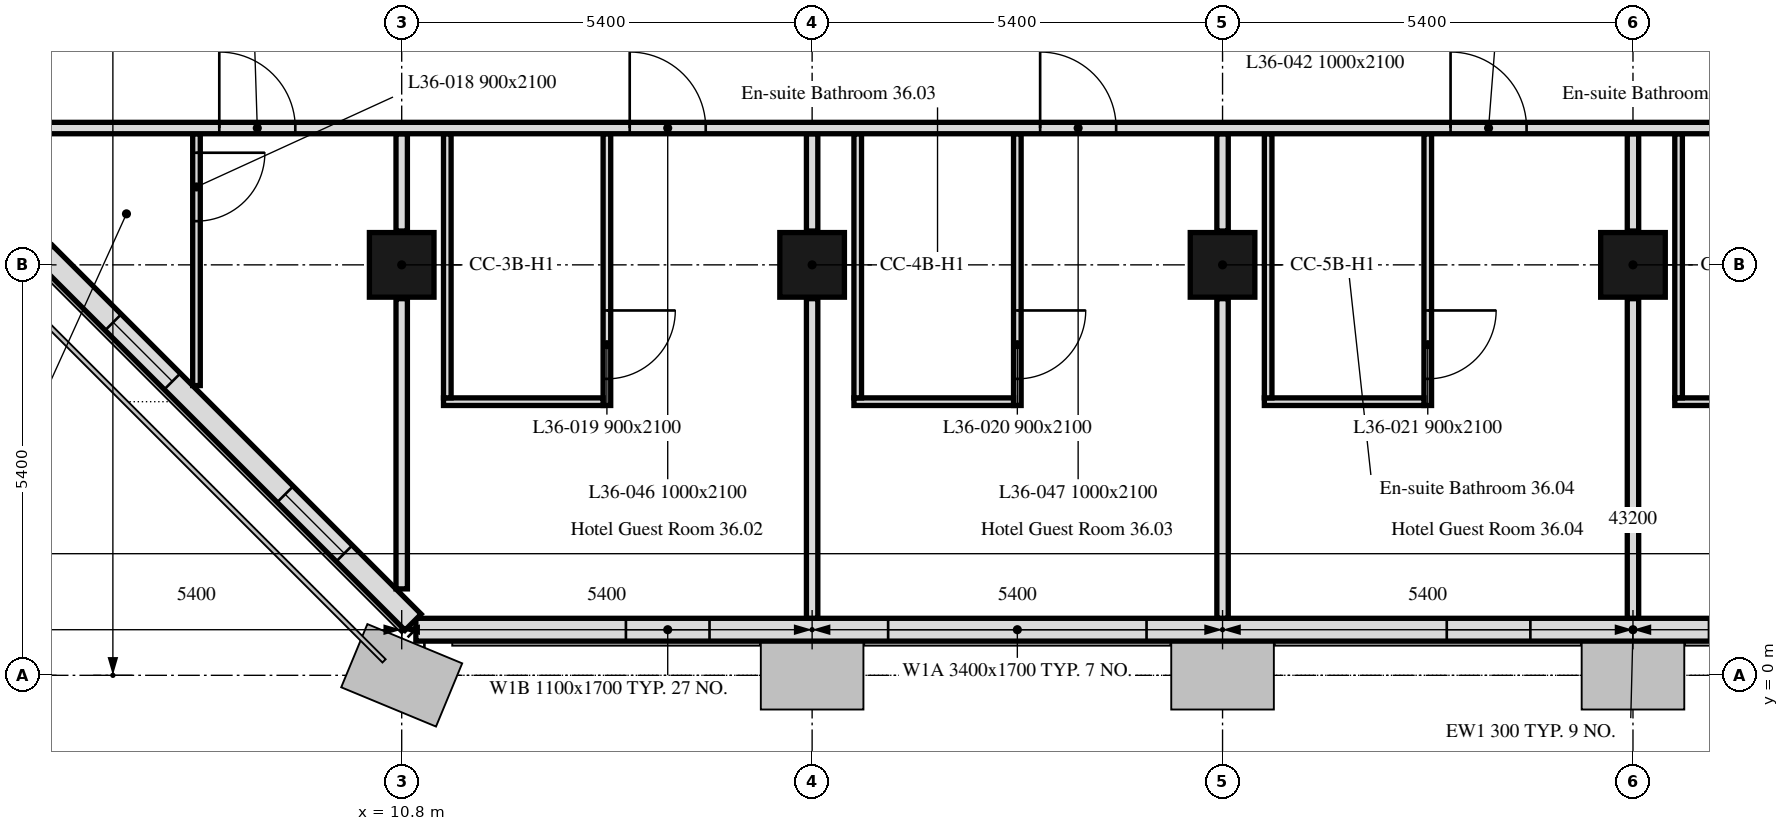
"""IFC4 building model, lengths in metres.
Left out: names, types, materials, properties, quantities, classifications, styles, units other than length and angle.
Written with IfcOpenShell. Run it as: python <this file> out.ifc"""

import sys

from ifc_helpers import new_model, si_unit, direction, frame, frame_2d, origin, origin_2d, place, context, subcontext, project, spatial, rectangle, extrude, element, fill, save


model = new_model("IFC4")
c1 = context("Model", 3, precision=1e-05, world=origin(), true_north=direction((0.0, 1.0)))
c2 = subcontext(c1, "Body", "Model", "MODEL_VIEW")
j1 = project(units=[si_unit("LENGTHUNIT", "METRE"), si_unit("PLANEANGLEUNIT", "RADIAN")], contexts=[c1])
p1 = place(None, origin())
s1 = spatial("IfcSite", under=j1, at=p1, CompositionType="ELEMENT")
p2 = place(p1, origin())
s2 = spatial("IfcBuilding", under=s1, at=p2, CompositionType="ELEMENT")
p3 = place(p2, frame((0.0, 0.0, 156.1)))
s3 = spatial("IfcBuildingStorey", under=s2, at=p3, CompositionType="ELEMENT", Elevation=156.1)
for number, where, z_axis, x_axis in (
    (1, (10.8, 5.4, 0.0), (0.0, 0.0, 1.0), (1.0, 0.0, 0.0)),
    (2, (16.2, 5.4, 0.0), (0.0, 0.0, 1.0), (1.0, 0.0, 0.0)),
    (3, (21.6, 5.4, 0.0), (0.0, 0.0, 1.0), (1.0, 0.0, 0.0)),
    (4, (27.0, 5.4, 0.0), (0.0, 0.0, 1.0), (1.0, 0.0, 0.0)),
):
    element("IfcColumn", number, at=place(p3, frame(where, z_axis=z_axis, x_axis=x_axis)), inside=s3, PredefinedType="COLUMN", context=c2, shape_type="SweptSolid", body=[
        extrude(rectangle(XDim=0.85, YDim=0.85, at=origin_2d()), origin(), (0.0, 0.0, 1.0), 3.0),
    ])
p4 = place(p3, frame((10.986, 0.6, 0.0), z_axis=(0.0, 0.0, 1.0), x_axis=(1.0, 0.0, 0.0)))
e5 = element("IfcWall", 5, at=p4, inside=s3, PredefinedType="SOLIDWALL", context=c2, shape_type="SweptSolid", body=[
    extrude(rectangle(XDim=32.027, YDim=0.3, at=frame_2d((16.014, 0.0))), origin(), (0.0, 0.0, 1.0), 3.0),
])
p5 = place(p4, frame((2.764, 0.0, 0.9)))
e6 = element("IfcOpeningElement", 6, at=p5, cuts=e5, PredefinedType="OPENING", context=c2, shape_type="SweptSolid", body=[
    extrude(rectangle(XDim=1.1, YDim=1.7, at=frame_2d((0.55, 0.85))), frame((0.0, 0.16, 0.0), z_axis=(0.0, -1.0, 0.0), x_axis=(1.0, 0.0, 0.0)), (0.0, 0.0, 1.0), 0.32),
])
p6 = place(p4, frame((6.214, 0.0, 0.9)))
e7 = element("IfcOpeningElement", 7, at=p6, cuts=e5, PredefinedType="OPENING", context=c2, shape_type="SweptSolid", body=[
    extrude(rectangle(XDim=3.4, YDim=1.7, at=frame_2d((1.7, 0.85))), frame((0.0, 0.16, 0.0), z_axis=(0.0, -1.0, 0.0), x_axis=(1.0, 0.0, 0.0)), (0.0, 0.0, 1.0), 0.32),
])
p7 = place(p4, frame((13.564, 0.0, 0.9)))
e8 = element("IfcOpeningElement", 8, at=p7, cuts=e5, PredefinedType="OPENING", context=c2, shape_type="SweptSolid", body=[
    extrude(rectangle(XDim=1.1, YDim=1.7, at=frame_2d((0.55, 0.85))), frame((0.0, 0.16, 0.0), z_axis=(0.0, -1.0, 0.0), x_axis=(1.0, 0.0, 0.0)), (0.0, 0.0, 1.0), 0.32),
])
p8 = place(p4, frame((17.014, 0.0, 0.9)))
e9 = element("IfcOpeningElement", 9, at=p8, cuts=e5, PredefinedType="OPENING", context=c2, shape_type="SweptSolid", body=[
    extrude(rectangle(XDim=3.4, YDim=1.7, at=frame_2d((1.7, 0.85))), frame((0.0, 0.16, 0.0), z_axis=(0.0, -1.0, 0.0), x_axis=(1.0, 0.0, 0.0)), (0.0, 0.0, 1.0), 0.32),
])
p9 = place(p4, frame((24.364, 0.0, 0.9)))
e10 = element("IfcOpeningElement", 10, at=p9, cuts=e5, PredefinedType="OPENING", context=c2, shape_type="SweptSolid", body=[
    extrude(rectangle(XDim=1.1, YDim=1.7, at=frame_2d((0.55, 0.85))), frame((0.0, 0.16, 0.0), z_axis=(0.0, -1.0, 0.0), x_axis=(1.0, 0.0, 0.0)), (0.0, 0.0, 1.0), 0.32),
])
p10 = place(p4, frame((27.814, 0.0, 0.9)))
e11 = element("IfcOpeningElement", 11, at=p10, cuts=e5, PredefinedType="OPENING", context=c2, shape_type="SweptSolid", body=[
    extrude(rectangle(XDim=3.4, YDim=1.7, at=frame_2d((1.7, 0.85))), frame((0.0, 0.16, 0.0), z_axis=(0.0, -1.0, 0.0), x_axis=(1.0, 0.0, 0.0)), (0.0, 0.0, 1.0), 0.32),
])
p11 = place(p3, frame((6.099, 5.55, 0.0), z_axis=(0.0, 0.0, 1.0), x_axis=(0.707106781187, -0.707106781187, 0.0)))
e12 = element("IfcWall", 12, at=p11, inside=s3, PredefinedType="SOLIDWALL", context=c2, shape_type="SweptSolid", body=[
    extrude(rectangle(XDim=6.86, YDim=0.3, at=frame_2d((3.43, 0.0))), origin(), (0.0, 0.0, 1.0), 3.0),
])
p12 = place(p11, frame((1.28, 0.0, 0.9)))
e13 = element("IfcOpeningElement", 13, at=p12, cuts=e12, PredefinedType="OPENING", context=c2, shape_type="SweptSolid", body=[
    extrude(rectangle(XDim=1.1, YDim=1.7, at=frame_2d((0.55, 0.85))), frame((0.0, 0.16, 0.0), z_axis=(0.0, -1.0, 0.0), x_axis=(1.0, 0.0, 0.0)), (0.0, 0.0, 1.0), 0.32),
])
p13 = place(p11, frame((4.48, 0.0, 0.9)))
e14 = element("IfcOpeningElement", 14, at=p13, cuts=e12, PredefinedType="OPENING", context=c2, shape_type="SweptSolid", body=[
    extrude(rectangle(XDim=1.1, YDim=1.7, at=frame_2d((0.55, 0.85))), frame((0.0, 0.16, 0.0), z_axis=(0.0, -1.0, 0.0), x_axis=(1.0, 0.0, 0.0)), (0.0, 0.0, 1.0), 0.32),
])
p14 = place(p3, frame((10.8, 1.137, 0.0), z_axis=(0.0, 0.0, 1.0), x_axis=(0.0, 1.0, 0.0)))
e15 = element("IfcWall", 15, at=p14, inside=s3, PredefinedType="PARTITIONING", context=c2, shape_type="SweptSolid", body=[
    extrude(rectangle(XDim=3.818, YDim=0.15, at=frame_2d((1.909, 0.0))), origin(), (0.0, 0.0, 1.0), 3.0),
])
p15 = place(p3, frame((10.8, 5.845, 0.0), z_axis=(0.0, 0.0, 1.0), x_axis=(0.0, 1.0, 0.0)))
e16 = element("IfcWall", 16, at=p15, inside=s3, PredefinedType="PARTITIONING", context=c2, shape_type="SweptSolid", body=[
    extrude(rectangle(XDim=1.28, YDim=0.15, at=frame_2d((0.64, 0.0))), origin(), (0.0, 0.0, 1.0), 3.0),
])
p16 = place(p3, frame((8.1, 7.125, 0.0), z_axis=(0.0, 0.0, 1.0), x_axis=(0.0, -1.0, 0.0)))
e17 = element("IfcWall", 17, at=p16, inside=s3, PredefinedType="PARTITIONING", context=c2, shape_type="SweptSolid", body=[
    extrude(rectangle(XDim=3.313, YDim=0.1, at=frame_2d((1.656, 0.0))), origin(), (0.0, 0.0, 1.0), 3.0),
])
p17 = place(p16, frame((0.25, 0.0, 0.0)))
e18 = element("IfcOpeningElement", 18, at=p17, cuts=e17, PredefinedType="OPENING", context=c2, shape_type="SweptSolid", body=[
    extrude(rectangle(XDim=0.9, YDim=2.1, at=frame_2d((0.45, 1.05))), frame((0.0, 0.05, 0.0), z_axis=(0.0, -1.0, 0.0), x_axis=(1.0, 0.0, 0.0)), (0.0, 0.0, 1.0), 0.1),
])
p18 = place(p3, frame((16.2, 0.751, 0.0), z_axis=(0.0, 0.0, 1.0), x_axis=(0.0, 1.0, 0.0)))
e19 = element("IfcWall", 19, at=p18, inside=s3, PredefinedType="PARTITIONING", context=c2, shape_type="SweptSolid", body=[
    extrude(rectangle(XDim=4.204, YDim=0.15, at=frame_2d((2.102, 0.0))), origin(), (0.0, 0.0, 1.0), 2.4),
])
p19 = place(p3, frame((16.2, 5.845, 0.0), z_axis=(0.0, 0.0, 1.0), x_axis=(0.0, 1.0, 0.0)))
e20 = element("IfcWall", 20, at=p19, inside=s3, PredefinedType="PARTITIONING", context=c2, shape_type="SweptSolid", body=[
    extrude(rectangle(XDim=1.28, YDim=0.15, at=frame_2d((0.64, 0.0))), origin(), (0.0, 0.0, 1.0), 2.4),
])
p20 = place(p3, frame((13.5, 7.125, 0.0), z_axis=(0.0, 0.0, 1.0), x_axis=(0.0, -1.0, 0.0)))
e21 = element("IfcWall", 21, at=p20, inside=s3, PredefinedType="PARTITIONING", context=c2, shape_type="SweptSolid", body=[
    extrude(rectangle(XDim=3.575, YDim=0.1, at=frame_2d((1.788, 0.0))), origin(), (0.0, 0.0, 1.0), 3.0),
])
p21 = place(p20, frame((2.325, 0.0, 0.0)))
e22 = element("IfcOpeningElement", 22, at=p21, cuts=e21, PredefinedType="OPENING", context=c2, shape_type="SweptSolid", body=[
    extrude(rectangle(XDim=0.9, YDim=2.1, at=frame_2d((0.45, 1.05))), frame((0.0, 0.05, 0.0), z_axis=(0.0, -1.0, 0.0), x_axis=(1.0, 0.0, 0.0)), (0.0, 0.0, 1.0), 0.1),
])
p22 = place(p3, frame((13.45, 3.6, 0.0), z_axis=(0.0, 0.0, 1.0), x_axis=(-1.0, 0.0, 0.0)))
e23 = element("IfcWall", 23, at=p22, inside=s3, PredefinedType="PARTITIONING", context=c2, shape_type="SweptSolid", body=[
    extrude(rectangle(XDim=2.1, YDim=0.1, at=frame_2d((1.05, 0.0))), origin(), (0.0, 0.0, 1.0), 3.0),
])
p23 = place(p3, frame((11.4, 3.65, 0.0), z_axis=(0.0, 0.0, 1.0), x_axis=(0.0, 1.0, 0.0)))
e24 = element("IfcWall", 24, at=p23, inside=s3, PredefinedType="PARTITIONING", context=c2, shape_type="SweptSolid", body=[
    extrude(rectangle(XDim=3.475, YDim=0.1, at=frame_2d((1.738, 0.0))), origin(), (0.0, 0.0, 1.0), 3.0),
])
p24 = place(p3, frame((21.6, 0.751, 0.0), z_axis=(0.0, 0.0, 1.0), x_axis=(0.0, 1.0, 0.0)))
e25 = element("IfcWall", 25, at=p24, inside=s3, PredefinedType="PARTITIONING", context=c2, shape_type="SweptSolid", body=[
    extrude(rectangle(XDim=4.204, YDim=0.15, at=frame_2d((2.102, 0.0))), origin(), (0.0, 0.0, 1.0), 2.4),
])
p25 = place(p3, frame((21.6, 5.845, 0.0), z_axis=(0.0, 0.0, 1.0), x_axis=(0.0, 1.0, 0.0)))
e26 = element("IfcWall", 26, at=p25, inside=s3, PredefinedType="PARTITIONING", context=c2, shape_type="SweptSolid", body=[
    extrude(rectangle(XDim=1.28, YDim=0.15, at=frame_2d((0.64, 0.0))), origin(), (0.0, 0.0, 1.0), 2.4),
])
p26 = place(p3, frame((18.9, 7.125, 0.0), z_axis=(0.0, 0.0, 1.0), x_axis=(0.0, -1.0, 0.0)))
e27 = element("IfcWall", 27, at=p26, inside=s3, PredefinedType="PARTITIONING", context=c2, shape_type="SweptSolid", body=[
    extrude(rectangle(XDim=3.575, YDim=0.1, at=frame_2d((1.788, 0.0))), origin(), (0.0, 0.0, 1.0), 3.0),
])
p27 = place(p26, frame((2.325, 0.0, 0.0)))
e28 = element("IfcOpeningElement", 28, at=p27, cuts=e27, PredefinedType="OPENING", context=c2, shape_type="SweptSolid", body=[
    extrude(rectangle(XDim=0.9, YDim=2.1, at=frame_2d((0.45, 1.05))), frame((0.0, 0.05, 0.0), z_axis=(0.0, -1.0, 0.0), x_axis=(1.0, 0.0, 0.0)), (0.0, 0.0, 1.0), 0.1),
])
p28 = place(p3, frame((18.85, 3.6, 0.0), z_axis=(0.0, 0.0, 1.0), x_axis=(-1.0, 0.0, 0.0)))
e29 = element("IfcWall", 29, at=p28, inside=s3, PredefinedType="PARTITIONING", context=c2, shape_type="SweptSolid", body=[
    extrude(rectangle(XDim=2.1, YDim=0.1, at=frame_2d((1.05, 0.0))), origin(), (0.0, 0.0, 1.0), 3.0),
])
p29 = place(p3, frame((16.8, 3.65, 0.0), z_axis=(0.0, 0.0, 1.0), x_axis=(0.0, 1.0, 0.0)))
e30 = element("IfcWall", 30, at=p29, inside=s3, PredefinedType="PARTITIONING", context=c2, shape_type="SweptSolid", body=[
    extrude(rectangle(XDim=3.475, YDim=0.1, at=frame_2d((1.738, 0.0))), origin(), (0.0, 0.0, 1.0), 3.0),
])
p30 = place(p3, frame((27.0, 0.751, 0.0), z_axis=(0.0, 0.0, 1.0), x_axis=(0.0, 1.0, 0.0)))
e31 = element("IfcWall", 31, at=p30, inside=s3, PredefinedType="PARTITIONING", context=c2, shape_type="SweptSolid", body=[
    extrude(rectangle(XDim=4.204, YDim=0.15, at=frame_2d((2.102, 0.0))), origin(), (0.0, 0.0, 1.0), 2.4),
])
p31 = place(p3, frame((27.0, 5.845, 0.0), z_axis=(0.0, 0.0, 1.0), x_axis=(0.0, 1.0, 0.0)))
e32 = element("IfcWall", 32, at=p31, inside=s3, PredefinedType="PARTITIONING", context=c2, shape_type="SweptSolid", body=[
    extrude(rectangle(XDim=1.28, YDim=0.15, at=frame_2d((0.64, 0.0))), origin(), (0.0, 0.0, 1.0), 2.4),
])
p32 = place(p3, frame((24.3, 7.125, 0.0), z_axis=(0.0, 0.0, 1.0), x_axis=(0.0, -1.0, 0.0)))
e33 = element("IfcWall", 33, at=p32, inside=s3, PredefinedType="PARTITIONING", context=c2, shape_type="SweptSolid", body=[
    extrude(rectangle(XDim=3.575, YDim=0.1, at=frame_2d((1.788, 0.0))), origin(), (0.0, 0.0, 1.0), 3.0),
])
p33 = place(p32, frame((2.325, 0.0, 0.0)))
e34 = element("IfcOpeningElement", 34, at=p33, cuts=e33, PredefinedType="OPENING", context=c2, shape_type="SweptSolid", body=[
    extrude(rectangle(XDim=0.9, YDim=2.1, at=frame_2d((0.45, 1.05))), frame((0.0, 0.05, 0.0), z_axis=(0.0, -1.0, 0.0), x_axis=(1.0, 0.0, 0.0)), (0.0, 0.0, 1.0), 0.1),
])
p34 = place(p3, frame((24.25, 3.6, 0.0), z_axis=(0.0, 0.0, 1.0), x_axis=(-1.0, 0.0, 0.0)))
e35 = element("IfcWall", 35, at=p34, inside=s3, PredefinedType="PARTITIONING", context=c2, shape_type="SweptSolid", body=[
    extrude(rectangle(XDim=2.1, YDim=0.1, at=frame_2d((1.05, 0.0))), origin(), (0.0, 0.0, 1.0), 3.0),
])
p35 = place(p3, frame((22.2, 3.65, 0.0), z_axis=(0.0, 0.0, 1.0), x_axis=(0.0, 1.0, 0.0)))
e36 = element("IfcWall", 36, at=p35, inside=s3, PredefinedType="PARTITIONING", context=c2, shape_type="SweptSolid", body=[
    extrude(rectangle(XDim=3.475, YDim=0.1, at=frame_2d((1.738, 0.0))), origin(), (0.0, 0.0, 1.0), 3.0),
])
p36 = place(p3, frame((29.65, 3.6, 0.0), z_axis=(0.0, 0.0, 1.0), x_axis=(-1.0, 0.0, 0.0)))
e37 = element("IfcWall", 37, at=p36, inside=s3, PredefinedType="PARTITIONING", context=c2, shape_type="SweptSolid", body=[
    extrude(rectangle(XDim=2.1, YDim=0.1, at=frame_2d((1.05, 0.0))), origin(), (0.0, 0.0, 1.0), 3.0),
])
p37 = place(p3, frame((27.6, 3.65, 0.0), z_axis=(0.0, 0.0, 1.0), x_axis=(0.0, 1.0, 0.0)))
e38 = element("IfcWall", 38, at=p37, inside=s3, PredefinedType="PARTITIONING", context=c2, shape_type="SweptSolid", body=[
    extrude(rectangle(XDim=3.475, YDim=0.1, at=frame_2d((1.738, 0.0))), origin(), (0.0, 0.0, 1.0), 3.0),
])
p38 = place(p3, frame((6.151, 7.2, 0.0), z_axis=(0.0, 0.0, 1.0), x_axis=(1.0, 0.0, 0.0)))
e39 = element("IfcWall", 39, at=p38, inside=s3, PredefinedType="PARTITIONING", context=c2, shape_type="SweptSolid", body=[
    extrude(rectangle(XDim=41.698, YDim=0.15, at=frame_2d((20.849, 0.0))), origin(), (0.0, 0.0, 1.0), 2.4),
])
p39 = place(p38, frame((2.249, 0.0, 0.0)))
e40 = element("IfcOpeningElement", 40, at=p39, cuts=e39, PredefinedType="OPENING", context=c2, shape_type="SweptSolid", body=[
    extrude(rectangle(XDim=1.0, YDim=2.1, at=frame_2d((0.5, 1.05))), frame((0.0, 0.075, 0.0), z_axis=(0.0, -1.0, 0.0), x_axis=(1.0, 0.0, 0.0)), (0.0, 0.0, 1.0), 0.15),
])
p40 = place(p38, frame((7.649, 0.0, 0.0)))
e41 = element("IfcOpeningElement", 41, at=p40, cuts=e39, PredefinedType="OPENING", context=c2, shape_type="SweptSolid", body=[
    extrude(rectangle(XDim=1.0, YDim=2.1, at=frame_2d((0.5, 1.05))), frame((0.0, 0.075, 0.0), z_axis=(0.0, -1.0, 0.0), x_axis=(1.0, 0.0, 0.0)), (0.0, 0.0, 1.0), 0.15),
])
p41 = place(p38, frame((13.049, 0.0, 0.0)))
e42 = element("IfcOpeningElement", 42, at=p41, cuts=e39, PredefinedType="OPENING", context=c2, shape_type="SweptSolid", body=[
    extrude(rectangle(XDim=1.0, YDim=2.1, at=frame_2d((0.5, 1.05))), frame((0.0, 0.075, 0.0), z_axis=(0.0, -1.0, 0.0), x_axis=(1.0, 0.0, 0.0)), (0.0, 0.0, 1.0), 0.15),
])
p42 = place(p38, frame((18.449, 0.0, 0.0)))
e43 = element("IfcOpeningElement", 43, at=p42, cuts=e39, PredefinedType="OPENING", context=c2, shape_type="SweptSolid", body=[
    extrude(rectangle(XDim=1.0, YDim=2.1, at=frame_2d((0.5, 1.05))), frame((0.0, 0.075, 0.0), z_axis=(0.0, -1.0, 0.0), x_axis=(1.0, 0.0, 0.0)), (0.0, 0.0, 1.0), 0.15),
])
p43 = place(p38, frame((23.849, 0.0, 0.0)))
e44 = element("IfcOpeningElement", 44, at=p43, cuts=e39, PredefinedType="OPENING", context=c2, shape_type="SweptSolid", body=[
    extrude(rectangle(XDim=1.0, YDim=2.1, at=frame_2d((0.5, 1.05))), frame((0.0, 0.075, 0.0), z_axis=(0.0, -1.0, 0.0), x_axis=(1.0, 0.0, 0.0)), (0.0, 0.0, 1.0), 0.15),
])
p44 = place(p38, frame((29.249, 0.0, 0.0)))
e45 = element("IfcOpeningElement", 45, at=p44, cuts=e39, PredefinedType="OPENING", context=c2, shape_type="SweptSolid", body=[
    extrude(rectangle(XDim=1.0, YDim=2.1, at=frame_2d((0.5, 1.05))), frame((0.0, 0.075, 0.0), z_axis=(0.0, -1.0, 0.0), x_axis=(1.0, 0.0, 0.0)), (0.0, 0.0, 1.0), 0.15),
])
p45 = place(p38, frame((37.599, 0.0, 0.0)))
e46 = element("IfcOpeningElement", 46, at=p45, cuts=e39, PredefinedType="OPENING", context=c2, shape_type="SweptSolid", body=[
    extrude(rectangle(XDim=1.0, YDim=2.1, at=frame_2d((0.5, 1.05))), frame((0.0, 0.075, 0.0), z_axis=(0.0, -1.0, 0.0), x_axis=(1.0, 0.0, 0.0)), (0.0, 0.0, 1.0), 0.15),
])
p46 = place(p5, origin())
e47 = element("IfcWindow", 47, at=p46, inside=s3, PartitioningType="SINGLE_PANEL", PredefinedType="WINDOW", context=c2, shape_type="SweptSolid", body=[
    extrude(rectangle(XDim=1.1, YDim=1.7, at=frame_2d((0.55, 0.85))), frame((0.0, 0.03, 0.0), z_axis=(0.0, -1.0, 0.0), x_axis=(1.0, 0.0, 0.0)), (0.0, 0.0, 1.0), 0.06),
])
fill(e6, e47)
p47 = place(p6, origin())
e48 = element("IfcWindow", 48, at=p47, inside=s3, PartitioningType="SINGLE_PANEL", PredefinedType="WINDOW", context=c2, shape_type="SweptSolid", body=[
    extrude(rectangle(XDim=3.4, YDim=1.7, at=frame_2d((1.7, 0.85))), frame((0.0, 0.03, 0.0), z_axis=(0.0, -1.0, 0.0), x_axis=(1.0, 0.0, 0.0)), (0.0, 0.0, 1.0), 0.06),
])
fill(e7, e48)
p48 = place(p7, origin())
e49 = element("IfcWindow", 49, at=p48, inside=s3, PartitioningType="SINGLE_PANEL", PredefinedType="WINDOW", context=c2, shape_type="SweptSolid", body=[
    extrude(rectangle(XDim=1.1, YDim=1.7, at=frame_2d((0.55, 0.85))), frame((0.0, 0.03, 0.0), z_axis=(0.0, -1.0, 0.0), x_axis=(1.0, 0.0, 0.0)), (0.0, 0.0, 1.0), 0.06),
])
fill(e8, e49)
p49 = place(p12, origin())
e50 = element("IfcWindow", 50, at=p49, inside=s3, PartitioningType="SINGLE_PANEL", PredefinedType="WINDOW", context=c2, shape_type="SweptSolid", body=[
    extrude(rectangle(XDim=1.1, YDim=1.7, at=frame_2d((0.55, 0.85))), frame((0.0, 0.03, 0.0), z_axis=(0.0, -1.0, 0.0), x_axis=(1.0, 0.0, 0.0)), (0.0, 0.0, 1.0), 0.06),
])
fill(e13, e50)
p50 = place(p13, origin())
e51 = element("IfcWindow", 51, at=p50, inside=s3, PartitioningType="SINGLE_PANEL", PredefinedType="WINDOW", context=c2, shape_type="SweptSolid", body=[
    extrude(rectangle(XDim=1.1, YDim=1.7, at=frame_2d((0.55, 0.85))), frame((0.0, 0.03, 0.0), z_axis=(0.0, -1.0, 0.0), x_axis=(1.0, 0.0, 0.0)), (0.0, 0.0, 1.0), 0.06),
])
fill(e14, e51)
p51 = place(p17, origin())
e52 = element("IfcDoor", 52, at=p51, inside=s3, OperationType="SINGLE_SWING_RIGHT", PredefinedType="DOOR", context=c2, shape_type="SweptSolid", body=[
    extrude(rectangle(XDim=0.9, YDim=2.1, at=frame_2d((0.45, 1.05))), frame((0.0, 0.025, 0.0), z_axis=(0.0, -1.0, 0.0), x_axis=(1.0, 0.0, 0.0)), (0.0, 0.0, 1.0), 0.05),
])
fill(e18, e52)
p52 = place(p21, origin())
e53 = element("IfcDoor", 53, at=p52, inside=s3, OperationType="SINGLE_SWING_RIGHT", PredefinedType="DOOR", context=c2, shape_type="SweptSolid", body=[
    extrude(rectangle(XDim=0.9, YDim=2.1, at=frame_2d((0.45, 1.05))), frame((0.0, 0.025, 0.0), z_axis=(0.0, -1.0, 0.0), x_axis=(1.0, 0.0, 0.0)), (0.0, 0.0, 1.0), 0.05),
])
fill(e22, e53)
p53 = place(p27, origin())
e54 = element("IfcDoor", 54, at=p53, inside=s3, OperationType="SINGLE_SWING_LEFT", PredefinedType="DOOR", context=c2, shape_type="SweptSolid", body=[
    extrude(rectangle(XDim=0.9, YDim=2.1, at=frame_2d((0.45, 1.05))), frame((0.0, 0.025, 0.0), z_axis=(0.0, -1.0, 0.0), x_axis=(1.0, 0.0, 0.0)), (0.0, 0.0, 1.0), 0.05),
])
fill(e28, e54)
p54 = place(p33, origin())
e55 = element("IfcDoor", 55, at=p54, inside=s3, OperationType="SINGLE_SWING_LEFT", PredefinedType="DOOR", context=c2, shape_type="SweptSolid", body=[
    extrude(rectangle(XDim=0.9, YDim=2.1, at=frame_2d((0.45, 1.05))), frame((0.0, 0.025, 0.0), z_axis=(0.0, -1.0, 0.0), x_axis=(1.0, 0.0, 0.0)), (0.0, 0.0, 1.0), 0.05),
])
fill(e34, e55)
p55 = place(p39, origin())
e56 = element("IfcDoor", 56, at=p55, inside=s3, OperationType="SINGLE_SWING_RIGHT", PredefinedType="DOOR", context=c2, shape_type="SweptSolid", body=[
    extrude(rectangle(XDim=1.0, YDim=2.1, at=frame_2d((0.5, 1.05))), frame((0.0, 0.025, 0.0), z_axis=(0.0, -1.0, 0.0), x_axis=(1.0, 0.0, 0.0)), (0.0, 0.0, 1.0), 0.05),
])
fill(e40, e56)
p56 = place(p40, origin())
e57 = element("IfcDoor", 57, at=p56, inside=s3, OperationType="SINGLE_SWING_LEFT", PredefinedType="DOOR", context=c2, shape_type="SweptSolid", body=[
    extrude(rectangle(XDim=1.0, YDim=2.1, at=frame_2d((0.5, 1.05))), frame((0.0, 0.025, 0.0), z_axis=(0.0, -1.0, 0.0), x_axis=(1.0, 0.0, 0.0)), (0.0, 0.0, 1.0), 0.05),
])
fill(e41, e57)
p57 = place(p41, origin())
e58 = element("IfcDoor", 58, at=p57, inside=s3, OperationType="SINGLE_SWING_LEFT", PredefinedType="DOOR", context=c2, shape_type="SweptSolid", body=[
    extrude(rectangle(XDim=1.0, YDim=2.1, at=frame_2d((0.5, 1.05))), frame((0.0, 0.025, 0.0), z_axis=(0.0, -1.0, 0.0), x_axis=(1.0, 0.0, 0.0)), (0.0, 0.0, 1.0), 0.05),
])
fill(e42, e58)
p58 = place(p42, origin())
e59 = element("IfcDoor", 59, at=p58, inside=s3, OperationType="SINGLE_SWING_RIGHT", PredefinedType="DOOR", context=c2, shape_type="SweptSolid", body=[
    extrude(rectangle(XDim=1.0, YDim=2.1, at=frame_2d((0.5, 1.05))), frame((0.0, 0.025, 0.0), z_axis=(0.0, -1.0, 0.0), x_axis=(1.0, 0.0, 0.0)), (0.0, 0.0, 1.0), 0.05),
])
fill(e43, e59)
save(model, sys.argv[1])
